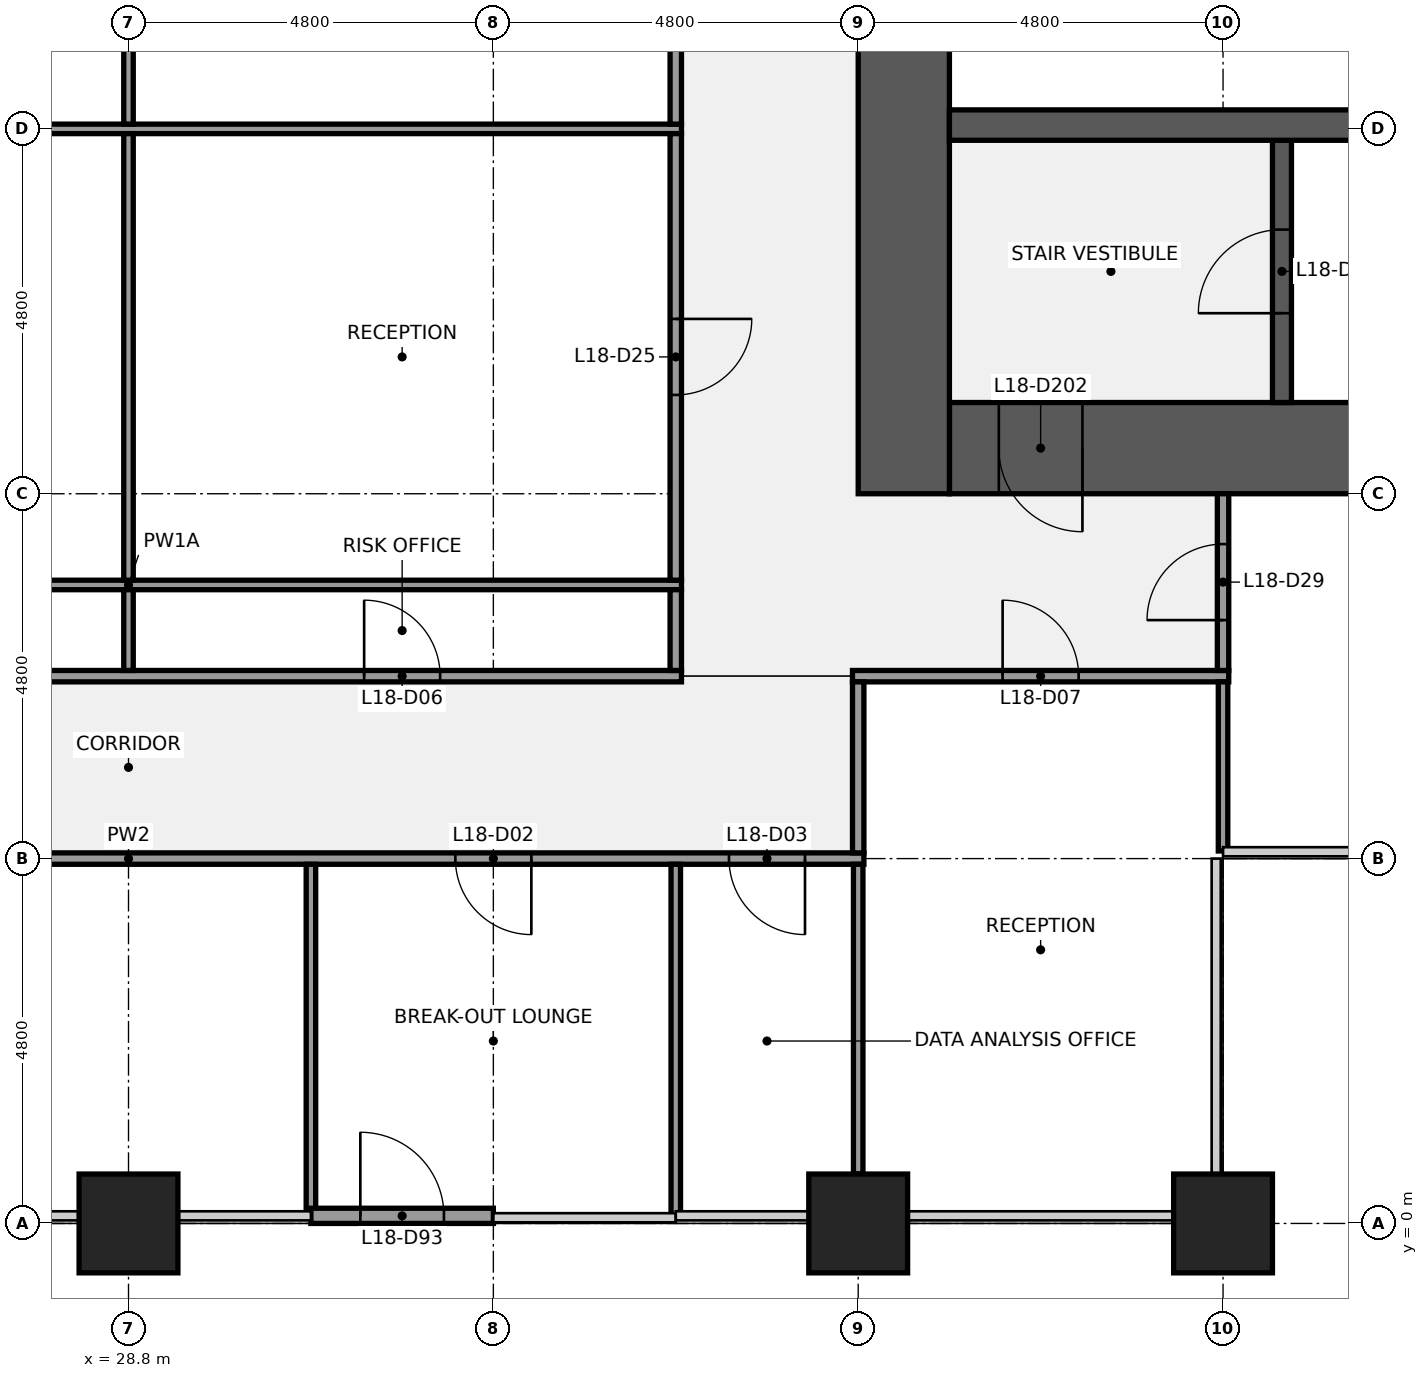
"""IFC4 building model, lengths in metres.
Left out: names, types, materials, properties, quantities, classifications, styles, units other than length and angle.
Written with IfcOpenShell. Run it as: python <this file> out.ifc"""

import sys

from ifc_helpers import new_model, si_unit, direction, frame, frame_2d, origin, origin_2d, place, context, subcontext, project, spatial, rectangle, extrude, element, fill, save


model = new_model("IFC4")
c1 = context("Model", 3, precision=1e-05, world=origin(), true_north=direction((0.0, 1.0)))
c2 = subcontext(c1, "Body", "Model", "MODEL_VIEW")
j1 = project(units=[si_unit("LENGTHUNIT", "METRE"), si_unit("PLANEANGLEUNIT", "RADIAN")], contexts=[c1])
p1 = place(None, origin())
s1 = spatial("IfcSite", under=j1, at=p1, CompositionType="ELEMENT")
p2 = place(p1, origin())
s2 = spatial("IfcBuilding", under=s1, at=p2, CompositionType="ELEMENT")
p3 = place(p2, frame((0.0, 0.0, 83.0)))
s3 = spatial("IfcBuildingStorey", under=s2, at=p3, CompositionType="ELEMENT", Elevation=83.0)
for number, where, z_axis, x_axis in (
    (1, (28.8, 0.0, 0.0), (0.0, 0.0, 1.0), (1.0, 0.0, 0.0)),
    (2, (38.4, 0.0, 0.0), (0.0, 0.0, 1.0), (1.0, 0.0, 0.0)),
    (3, (43.2, 0.0, 0.0), (0.0, 0.0, 1.0), (1.0, 0.0, 0.0)),
):
    element("IfcColumn", number, at=place(p3, frame(where, z_axis=z_axis, x_axis=x_axis)), inside=s3, PredefinedType="COLUMN", context=c2, shape_type="SweptSolid", body=[
        extrude(rectangle(XDim=1.3, YDim=1.3, at=origin_2d()), origin(), (0.0, 0.0, 1.0), 4.0),
    ])
p4 = place(p3, frame((52.8, 10.2, 0.0), z_axis=(0.0, 0.0, 1.0), x_axis=(-1.0, 0.0, 0.0)))
e4 = element("IfcWall", 4, at=p4, inside=s3, PredefinedType="SHEAR", context=c2, shape_type="SweptSolid", body=[
    extrude(rectangle(XDim=13.2, YDim=1.2, at=frame_2d((6.6, 0.0))), origin(), (0.0, 0.0, 1.0), 3.7),
])
p5 = place(p4, frame((11.45, 0.0, 0.0)))
e5 = element("IfcOpeningElement", 5, at=p5, cuts=e4, PredefinedType="OPENING", context=c2, shape_type="SweptSolid", body=[
    extrude(rectangle(XDim=1.1, YDim=2.1, at=frame_2d((0.55, 1.05))), frame((0.0, 0.61, 0.0), z_axis=(0.0, -1.0, 0.0), x_axis=(1.0, 0.0, 0.0)), (0.0, 0.0, 1.0), 1.22),
])
p6 = place(p3, frame((39.0, 9.6, 0.0), z_axis=(0.0, 0.0, 1.0), x_axis=(0.0, 1.0, 0.0)))
e6 = element("IfcWall", 6, at=p6, inside=s3, PredefinedType="SHEAR", context=c2, shape_type="SweptSolid", body=[
    extrude(rectangle(XDim=28.8, YDim=1.2, at=frame_2d((14.4, 0.0))), origin(), (0.0, 0.0, 1.0), 3.7),
])
p7 = place(p6, frame((8.7, 0.0, 0.0)))
e7 = element("IfcOpeningElement", 7, at=p7, cuts=e6, PredefinedType="OPENING", context=c2, shape_type="SweptSolid", body=[
    extrude(rectangle(XDim=1.8, YDim=2.1, at=frame_2d((0.9, 1.05))), frame((0.0, 0.61, 0.0), z_axis=(0.0, -1.0, 0.0), x_axis=(1.0, 0.0, 0.0)), (0.0, 0.0, 1.0), 1.22),
])
p8 = place(p6, frame((18.3, 0.0, 0.0)))
e8 = element("IfcOpeningElement", 8, at=p8, cuts=e6, PredefinedType="OPENING", context=c2, shape_type="SweptSolid", body=[
    extrude(rectangle(XDim=1.8, YDim=2.1, at=frame_2d((0.9, 1.05))), frame((0.0, 0.61, 0.0), z_axis=(0.0, -1.0, 0.0), x_axis=(1.0, 0.0, 0.0)), (0.0, 0.0, 1.0), 1.22),
])
p9 = place(p3, frame((43.975, 10.8, 0.0), z_axis=(0.0, 0.0, 1.0), x_axis=(0.0, 1.0, 0.0)))
e9 = element("IfcWall", 9, at=p9, inside=s3, PredefinedType="SHEAR", context=c2, shape_type="SweptSolid", body=[
    extrude(rectangle(XDim=3.45, YDim=0.25, at=frame_2d((1.725, 0.0))), origin(), (0.0, 0.0, 1.0), 3.7),
])
p10 = place(p9, frame((1.175, 0.0, 0.0)))
e10 = element("IfcOpeningElement", 10, at=p10, cuts=e9, PredefinedType="OPENING", context=c2, shape_type="SweptSolid", body=[
    extrude(rectangle(XDim=1.1, YDim=2.1, at=frame_2d((0.55, 1.05))), frame((0.0, 0.135, 0.0), z_axis=(0.0, -1.0, 0.0), x_axis=(1.0, 0.0, 0.0)), (0.0, 0.0, 1.0), 0.27),
])
p11 = place(p3, frame((39.6, 14.45, 0.0), z_axis=(0.0, 0.0, 1.0), x_axis=(1.0, 0.0, 0.0)))
e11 = element("IfcWall", 11, at=p11, inside=s3, PredefinedType="SHEAR", context=c2, shape_type="SweptSolid", body=[
    extrude(rectangle(XDim=16.8, YDim=0.4, at=frame_2d((8.4, 0.0))), origin(), (0.0, 0.0, 1.0), 3.7),
])
p12 = place(p3, frame((19.125, 4.8, 0.0), z_axis=(0.0, 0.0, 1.0), x_axis=(1.0, 0.0, 0.0)))
e12 = element("IfcWall", 12, at=p12, inside=s3, PredefinedType="PARTITIONING", context=c2, shape_type="SweptSolid", body=[
    extrude(rectangle(XDim=19.35, YDim=0.15, at=frame_2d((9.675, 0.0))), origin(), (0.0, 0.0, 1.0), 2.709),
])
p13 = place(p12, frame((5.575, 0.0, 0.0)))
e13 = element("IfcOpeningElement", 13, at=p13, cuts=e12, PredefinedType="OPENING", context=c2, shape_type="SweptSolid", body=[
    extrude(rectangle(XDim=1.0, YDim=2.1, at=frame_2d((0.5, 1.05))), frame((0.0, 0.085, 0.0), z_axis=(0.0, -1.0, 0.0), x_axis=(1.0, 0.0, 0.0)), (0.0, 0.0, 1.0), 0.17),
])
p14 = place(p12, frame((13.975, 0.0, 0.0)))
e14 = element("IfcOpeningElement", 14, at=p14, cuts=e12, PredefinedType="OPENING", context=c2, shape_type="SweptSolid", body=[
    extrude(rectangle(XDim=1.0, YDim=2.1, at=frame_2d((0.5, 1.05))), frame((0.0, 0.085, 0.0), z_axis=(0.0, -1.0, 0.0), x_axis=(1.0, 0.0, 0.0)), (0.0, 0.0, 1.0), 0.17),
])
p15 = place(p12, frame((17.575, 0.0, 0.0)))
e15 = element("IfcOpeningElement", 15, at=p15, cuts=e12, PredefinedType="OPENING", context=c2, shape_type="SweptSolid", body=[
    extrude(rectangle(XDim=1.0, YDim=2.1, at=frame_2d((0.5, 1.05))), frame((0.0, 0.085, 0.0), z_axis=(0.0, -1.0, 0.0), x_axis=(1.0, 0.0, 0.0)), (0.0, 0.0, 1.0), 0.17),
])
p16 = place(p3, frame((21.525, 7.2, 0.0), z_axis=(0.0, 0.0, 1.0), x_axis=(1.0, 0.0, 0.0)))
e16 = element("IfcWall", 16, at=p16, inside=s3, PredefinedType="PARTITIONING", context=c2, shape_type="SweptSolid", body=[
    extrude(rectangle(XDim=14.55, YDim=0.15, at=frame_2d((7.275, 0.0))), origin(), (0.0, 0.0, 1.0), 2.709),
])
p17 = place(p16, frame((3.175, 0.0, 0.0)))
e17 = element("IfcOpeningElement", 17, at=p17, cuts=e16, PredefinedType="OPENING", context=c2, shape_type="SweptSolid", body=[
    extrude(rectangle(XDim=1.0, YDim=2.1, at=frame_2d((0.5, 1.05))), frame((0.0, 0.085, 0.0), z_axis=(0.0, -1.0, 0.0), x_axis=(1.0, 0.0, 0.0)), (0.0, 0.0, 1.0), 0.17),
])
p18 = place(p16, frame((10.375, 0.0, 0.0)))
e18 = element("IfcOpeningElement", 18, at=p18, cuts=e16, PredefinedType="OPENING", context=c2, shape_type="SweptSolid", body=[
    extrude(rectangle(XDim=1.0, YDim=2.1, at=frame_2d((0.5, 1.05))), frame((0.0, 0.085, 0.0), z_axis=(0.0, -1.0, 0.0), x_axis=(1.0, 0.0, 0.0)), (0.0, 0.0, 1.0), 0.17),
])
p19 = place(p3, frame((38.325, 7.2, 0.0), z_axis=(0.0, 0.0, 1.0), x_axis=(1.0, 0.0, 0.0)))
e19 = element("IfcWall", 19, at=p19, inside=s3, PredefinedType="PARTITIONING", context=c2, shape_type="SweptSolid", body=[
    extrude(rectangle(XDim=4.95, YDim=0.15, at=frame_2d((2.475, 0.0))), origin(), (0.0, 0.0, 1.0), 2.709),
])
p20 = place(p19, frame((1.975, 0.0, 0.0)))
e20 = element("IfcOpeningElement", 20, at=p20, cuts=e19, PredefinedType="OPENING", context=c2, shape_type="SweptSolid", body=[
    extrude(rectangle(XDim=1.0, YDim=2.1, at=frame_2d((0.5, 1.05))), frame((0.0, 0.085, 0.0), z_axis=(0.0, -1.0, 0.0), x_axis=(1.0, 0.0, 0.0)), (0.0, 0.0, 1.0), 0.17),
])
for number, where, z_axis, x_axis in (
    (21, (21.525, 8.4, 0.0), (0.0, 0.0, 1.0), (1.0, 0.0, 0.0)),
    (22, (21.525, 14.4, 0.0), (0.0, 0.0, 1.0), (1.0, 0.0, 0.0)),
):
    element("IfcWall", number, at=place(p3, frame(where, z_axis=z_axis, x_axis=x_axis)), inside=s3, PredefinedType="PARTITIONING", context=c2, shape_type="SweptSolid", body=[
        extrude(rectangle(XDim=14.55, YDim=0.125, at=frame_2d((7.275, 0.0))), origin(), (0.0, 0.0, 1.0), 2.709),
    ])
p21 = place(p3, frame((28.8, 7.275, 0.0), z_axis=(0.0, 0.0, 1.0), x_axis=(0.0, 1.0, 0.0)))
e23 = element("IfcWall", 23, at=p21, inside=s3, PredefinedType="PARTITIONING", context=c2, shape_type="SweptSolid", body=[
    extrude(rectangle(XDim=1.062, YDim=0.125, at=frame_2d((0.531, 0.0))), origin(), (0.0, 0.0, 1.0), 2.709),
])
p22 = place(p3, frame((28.8, 8.462, 0.0), z_axis=(0.0, 0.0, 1.0), x_axis=(0.0, 1.0, 0.0)))
e24 = element("IfcWall", 24, at=p22, inside=s3, PredefinedType="PARTITIONING", context=c2, shape_type="SweptSolid", body=[
    extrude(rectangle(XDim=5.875, YDim=0.125, at=frame_2d((2.938, 0.0))), origin(), (0.0, 0.0, 1.0), 2.709),
])
p23 = place(p3, frame((28.8, 14.462, 0.0), z_axis=(0.0, 0.0, 1.0), x_axis=(0.0, 1.0, 0.0)))
e25 = element("IfcWall", 25, at=p23, inside=s3, PredefinedType="PARTITIONING", context=c2, shape_type="SweptSolid", body=[
    extrude(rectangle(XDim=8.275, YDim=0.125, at=frame_2d((4.138, 0.0))), origin(), (0.0, 0.0, 1.0), 2.709),
])
for number, where, z_axis, x_axis in (
    (26, (31.2, 0.1, 0.0), (0.0, 0.0, 1.0), (0.0, 1.0, 0.0)),
    (27, (36.0, 0.1, 0.0), (0.0, 0.0, 1.0), (0.0, 1.0, 0.0)),
):
    element("IfcWall", number, at=place(p3, frame(where, z_axis=z_axis, x_axis=x_axis)), inside=s3, PredefinedType="PARTITIONING", context=c2, shape_type="SweptSolid", body=[
        extrude(rectangle(XDim=4.625, YDim=0.125, at=frame_2d((2.312, 0.0))), origin(), (0.0, 0.0, 1.0), 2.709),
    ])
p24 = place(p3, frame((36.0, 7.275, 0.0), z_axis=(0.0, 0.0, 1.0), x_axis=(0.0, 1.0, 0.0)))
e28 = element("IfcWall", 28, at=p24, inside=s3, PredefinedType="PARTITIONING", context=c2, shape_type="SweptSolid", body=[
    extrude(rectangle(XDim=1.062, YDim=0.15, at=frame_2d((0.531, 0.0))), origin(), (0.0, 0.0, 1.0), 2.709),
])
p25 = place(p3, frame((36.0, 8.462, 0.0), z_axis=(0.0, 0.0, 1.0), x_axis=(0.0, 1.0, 0.0)))
e29 = element("IfcWall", 29, at=p25, inside=s3, PredefinedType="PARTITIONING", context=c2, shape_type="SweptSolid", body=[
    extrude(rectangle(XDim=5.875, YDim=0.15, at=frame_2d((2.938, 0.0))), origin(), (0.0, 0.0, 1.0), 2.709),
])
p26 = place(p25, frame((2.438, 0.0, 0.0)))
e30 = element("IfcOpeningElement", 30, at=p26, cuts=e29, PredefinedType="OPENING", context=c2, shape_type="SweptSolid", body=[
    extrude(rectangle(XDim=1.0, YDim=2.1, at=frame_2d((0.5, 1.05))), frame((0.0, 0.085, 0.0), z_axis=(0.0, -1.0, 0.0), x_axis=(1.0, 0.0, 0.0)), (0.0, 0.0, 1.0), 0.17),
])
p27 = place(p3, frame((36.0, 14.462, 0.0), z_axis=(0.0, 0.0, 1.0), x_axis=(0.0, 1.0, 0.0)))
e31 = element("IfcWall", 31, at=p27, inside=s3, PredefinedType="PARTITIONING", context=c2, shape_type="SweptSolid", body=[
    extrude(rectangle(XDim=8.275, YDim=0.15, at=frame_2d((4.138, 0.0))), origin(), (0.0, 0.0, 1.0), 2.709),
])
p28 = place(p27, frame((3.637, 0.0, 0.0)))
e32 = element("IfcOpeningElement", 32, at=p28, cuts=e31, PredefinedType="OPENING", context=c2, shape_type="SweptSolid", body=[
    extrude(rectangle(XDim=1.0, YDim=2.1, at=frame_2d((0.5, 1.05))), frame((0.0, 0.085, 0.0), z_axis=(0.0, -1.0, 0.0), x_axis=(1.0, 0.0, 0.0)), (0.0, 0.0, 1.0), 0.17),
])
p29 = place(p3, frame((38.4, 0.65, 0.0), z_axis=(0.0, 0.0, 1.0), x_axis=(0.0, 1.0, 0.0)))
e33 = element("IfcWall", 33, at=p29, inside=s3, PredefinedType="PARTITIONING", context=c2, shape_type="SweptSolid", body=[
    extrude(rectangle(XDim=4.075, YDim=0.125, at=frame_2d((2.038, 0.0))), origin(), (0.0, 0.0, 1.0), 2.709),
])
p30 = place(p3, frame((38.4, 4.875, 0.0), z_axis=(0.0, 0.0, 1.0), x_axis=(0.0, 1.0, 0.0)))
e34 = element("IfcWall", 34, at=p30, inside=s3, PredefinedType="PARTITIONING", context=c2, shape_type="SweptSolid", body=[
    extrude(rectangle(XDim=2.25, YDim=0.15, at=frame_2d((1.125, 0.0))), origin(), (0.0, 0.0, 1.0), 2.709),
])
p31 = place(p3, frame((43.2, 4.9, 0.0), z_axis=(0.0, 0.0, 1.0), x_axis=(0.0, 1.0, 0.0)))
e35 = element("IfcWall", 35, at=p31, inside=s3, PredefinedType="PARTITIONING", context=c2, shape_type="SweptSolid", body=[
    extrude(rectangle(XDim=2.225, YDim=0.125, at=frame_2d((1.113, 0.0))), origin(), (0.0, 0.0, 1.0), 2.709),
])
p32 = place(p3, frame((43.2, 7.275, 0.0), z_axis=(0.0, 0.0, 1.0), x_axis=(0.0, 1.0, 0.0)))
e36 = element("IfcWall", 36, at=p32, inside=s3, PredefinedType="PARTITIONING", context=c2, shape_type="SweptSolid", body=[
    extrude(rectangle(XDim=2.325, YDim=0.15, at=frame_2d((1.163, 0.0))), origin(), (0.0, 0.0, 1.0), 2.709),
])
p33 = place(p32, frame((0.663, 0.0, 0.0)))
e37 = element("IfcOpeningElement", 37, at=p33, cuts=e36, PredefinedType="OPENING", context=c2, shape_type="SweptSolid", body=[
    extrude(rectangle(XDim=1.0, YDim=2.1, at=frame_2d((0.5, 1.05))), frame((0.0, 0.085, 0.0), z_axis=(0.0, -1.0, 0.0), x_axis=(1.0, 0.0, 0.0)), (0.0, 0.0, 1.0), 0.17),
])
p34 = place(p3, frame((31.2, 0.1, 0.0), z_axis=(0.0, 0.0, 1.0), x_axis=(1.0, 0.0, 0.0)))
e38 = element("IfcWall", 38, at=p34, inside=s3, PredefinedType="SOLIDWALL", context=c2, shape_type="SweptSolid", body=[
    extrude(rectangle(XDim=2.4, YDim=0.2, at=frame_2d((1.2, 0.0))), origin(), (0.0, 0.0, 1.0), 3.301),
])
p35 = place(p34, frame((0.65, 0.0, 0.0)))
e39 = element("IfcOpeningElement", 39, at=p35, cuts=e38, PredefinedType="OPENING", context=c2, shape_type="SweptSolid", body=[
    extrude(rectangle(XDim=1.1, YDim=2.1, at=frame_2d((0.55, 1.05))), frame((0.0, 0.11, 0.0), z_axis=(0.0, -1.0, 0.0), x_axis=(1.0, 0.0, 0.0)), (0.0, 0.0, 1.0), 0.22),
])
for number, where, z_axis, x_axis in (
    (40, (38.4, -1.075, 0.0), (0.0, 0.0, 1.0), (1.0, 0.0, 0.0)),
    (41, (43.2, -1.075, 0.0), (0.0, 0.0, 1.0), (1.0, 0.0, 0.0)),
):
    element("IfcColumn", number, at=place(p3, frame(where, z_axis=z_axis, x_axis=x_axis)), inside=s3, PredefinedType="PILASTER", context=c2, shape_type="SweptSolid", body=[
        extrude(rectangle(XDim=4.2, YDim=0.85, at=origin_2d()), origin(), (0.0, 0.0, 1.0), 4.0),
    ])
p36 = place(p10, origin())
e42 = element("IfcDoor", 42, at=p36, inside=s3, OperationType="SINGLE_SWING_LEFT", PredefinedType="DOOR", context=c2, shape_type="SweptSolid", body=[
    extrude(rectangle(XDim=1.1, YDim=2.1, at=frame_2d((0.55, 1.05))), frame((0.0, 0.025, 0.0), z_axis=(0.0, -1.0, 0.0), x_axis=(1.0, 0.0, 0.0)), (0.0, 0.0, 1.0), 0.05),
])
fill(e10, e42)
p37 = place(p5, origin())
e43 = element("IfcDoor", 43, at=p37, inside=s3, OperationType="SINGLE_SWING_LEFT", PredefinedType="DOOR", context=c2, shape_type="SweptSolid", body=[
    extrude(rectangle(XDim=1.1, YDim=2.1, at=frame_2d((0.55, 1.05))), frame((0.0, 0.025, 0.0), z_axis=(0.0, -1.0, 0.0), x_axis=(1.0, 0.0, 0.0)), (0.0, 0.0, 1.0), 0.05),
])
fill(e5, e43)
p38 = place(p14, origin())
e44 = element("IfcDoor", 44, at=p38, inside=s3, OperationType="SINGLE_SWING_RIGHT", PredefinedType="DOOR", context=c2, shape_type="SweptSolid", body=[
    extrude(rectangle(XDim=1.0, YDim=2.1, at=frame_2d((0.5, 1.05))), frame((0.0, 0.025, 0.0), z_axis=(0.0, -1.0, 0.0), x_axis=(1.0, 0.0, 0.0)), (0.0, 0.0, 1.0), 0.05),
])
fill(e14, e44)
p39 = place(p15, origin())
e45 = element("IfcDoor", 45, at=p39, inside=s3, OperationType="SINGLE_SWING_RIGHT", PredefinedType="DOOR", context=c2, shape_type="SweptSolid", body=[
    extrude(rectangle(XDim=1.0, YDim=2.1, at=frame_2d((0.5, 1.05))), frame((0.0, 0.025, 0.0), z_axis=(0.0, -1.0, 0.0), x_axis=(1.0, 0.0, 0.0)), (0.0, 0.0, 1.0), 0.05),
])
fill(e15, e45)
p40 = place(p18, origin())
e46 = element("IfcDoor", 46, at=p40, inside=s3, OperationType="SINGLE_SWING_LEFT", PredefinedType="DOOR", context=c2, shape_type="SweptSolid", body=[
    extrude(rectangle(XDim=1.0, YDim=2.1, at=frame_2d((0.5, 1.05))), frame((0.0, 0.025, 0.0), z_axis=(0.0, -1.0, 0.0), x_axis=(1.0, 0.0, 0.0)), (0.0, 0.0, 1.0), 0.05),
])
fill(e18, e46)
p41 = place(p20, origin())
e47 = element("IfcDoor", 47, at=p41, inside=s3, OperationType="SINGLE_SWING_LEFT", PredefinedType="DOOR", context=c2, shape_type="SweptSolid", body=[
    extrude(rectangle(XDim=1.0, YDim=2.1, at=frame_2d((0.5, 1.05))), frame((0.0, 0.025, 0.0), z_axis=(0.0, -1.0, 0.0), x_axis=(1.0, 0.0, 0.0)), (0.0, 0.0, 1.0), 0.05),
])
fill(e20, e47)
p42 = place(p26, origin())
e48 = element("IfcDoor", 48, at=p42, inside=s3, OperationType="SINGLE_SWING_RIGHT", PredefinedType="DOOR", context=c2, shape_type="SweptSolid", body=[
    extrude(rectangle(XDim=1.0, YDim=2.1, at=frame_2d((0.5, 1.05))), frame((0.0, 0.025, 0.0), z_axis=(0.0, -1.0, 0.0), x_axis=(1.0, 0.0, 0.0)), (0.0, 0.0, 1.0), 0.05),
])
fill(e30, e48)
p43 = place(p33, origin())
e49 = element("IfcDoor", 49, at=p43, inside=s3, OperationType="SINGLE_SWING_LEFT", PredefinedType="DOOR", context=c2, shape_type="SweptSolid", body=[
    extrude(rectangle(XDim=1.0, YDim=2.1, at=frame_2d((0.5, 1.05))), frame((0.0, 0.025, 0.0), z_axis=(0.0, -1.0, 0.0), x_axis=(1.0, 0.0, 0.0)), (0.0, 0.0, 1.0), 0.05),
])
fill(e37, e49)
p44 = place(p35, origin())
e50 = element("IfcDoor", 50, at=p44, inside=s3, OperationType="SINGLE_SWING_LEFT", PredefinedType="DOOR", context=c2, shape_type="SweptSolid", body=[
    extrude(rectangle(XDim=1.1, YDim=2.1, at=frame_2d((0.55, 1.05))), frame((0.0, 0.025, 0.0), z_axis=(0.0, -1.0, 0.0), x_axis=(1.0, 0.0, 0.0)), (0.0, 0.0, 1.0), 0.05),
])
fill(e39, e50)
save(model, sys.argv[1])
